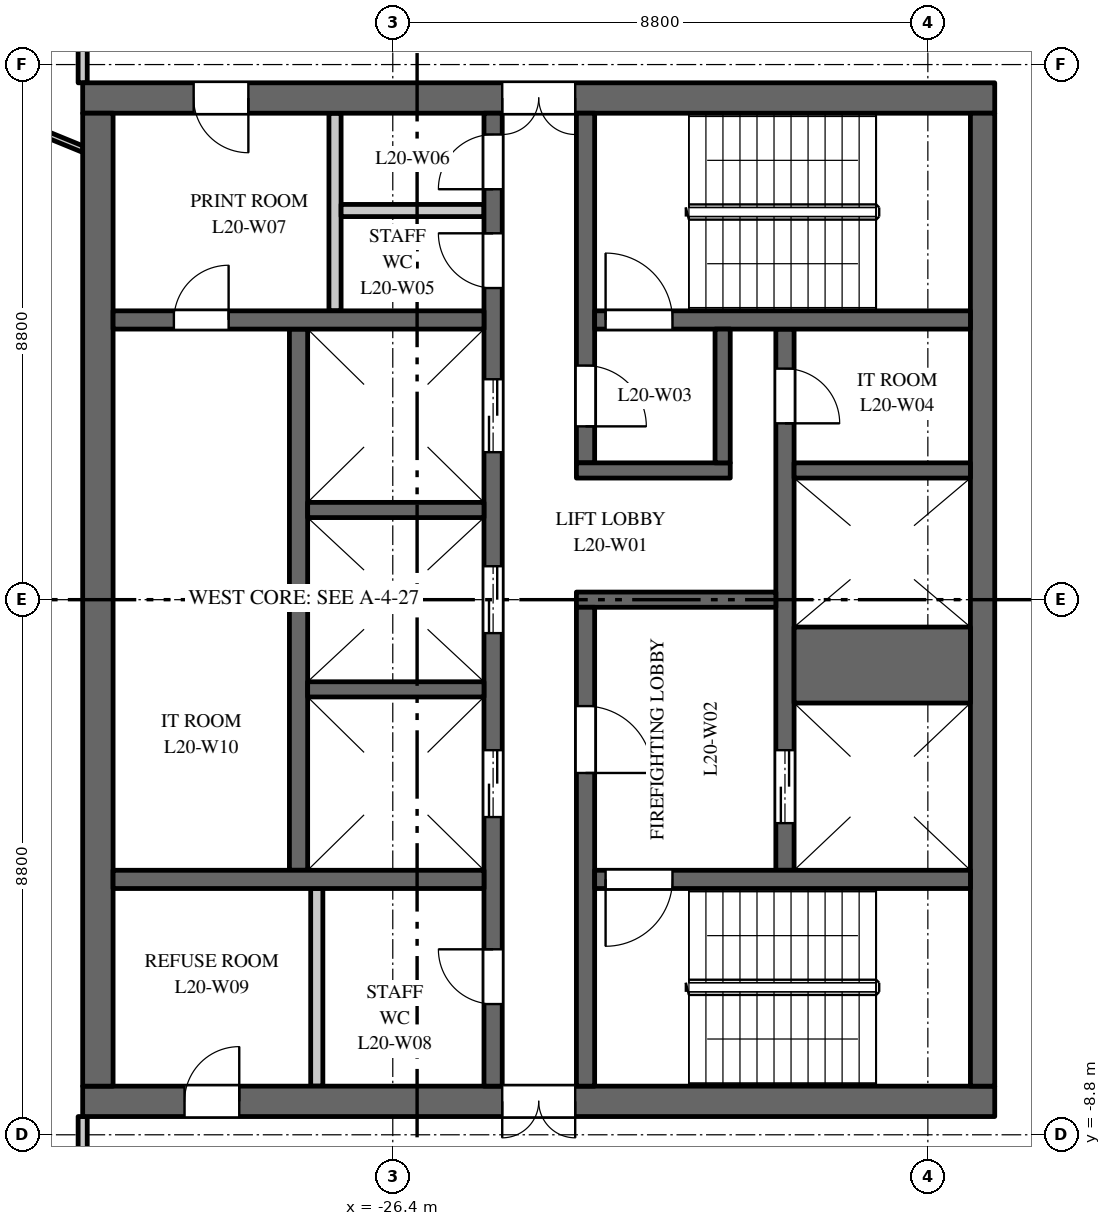
"""IFC4 building model, lengths in metres.
Left out: names, types, materials, properties, quantities, classifications, styles, units other than length and angle.
Written with IfcOpenShell. Run it as: python <this file> out.ifc"""

import sys

from ifc_helpers import new_model, si_unit, direction, frame, frame_2d, origin, place, context, subcontext, project, spatial, rectangle, extrude, element, fill, save


model = new_model("IFC4")
c1 = context("Model", 3, precision=1e-05, world=origin(), true_north=direction((0.0, 1.0)))
c2 = subcontext(c1, "Body", "Model", "MODEL_VIEW")
j1 = project(units=[si_unit("LENGTHUNIT", "METRE"), si_unit("PLANEANGLEUNIT", "RADIAN")], contexts=[c1])
p1 = place(None, origin())
s1 = spatial("IfcSite", under=j1, at=p1, CompositionType="ELEMENT")
p2 = place(p1, origin())
s2 = spatial("IfcBuilding", under=s1, at=p2, CompositionType="ELEMENT")
p3 = place(p2, frame((0.0, 0.0, 92.0)))
s3 = spatial("IfcBuildingStorey", under=s2, at=p3, CompositionType="ELEMENT", Elevation=92.0)
p4 = place(p3, frame((-16.5, 8.25, 0.0), z_axis=(0.0, 0.0, 1.0), x_axis=(-1.0, 0.0, 0.0)))
e1 = element("IfcWall", 1, at=p4, inside=s3, PredefinedType="SHEAR", context=c2, shape_type="SweptSolid", body=[
    extrude(rectangle(XDim=15.0, YDim=0.5, at=frame_2d((7.5, 0.0))), origin(), (0.0, 0.0, 1.0), 3.7),
])
p5 = place(p4, frame((6.9, 0.0, 0.0)))
e2 = element("IfcOpeningElement", 2, at=p5, cuts=e1, PredefinedType="OPENING", context=c2, shape_type="SweptSolid", body=[
    extrude(rectangle(XDim=1.2, YDim=2.1, at=frame_2d((0.6, 1.05))), frame((0.0, 0.26, 0.0), z_axis=(0.0, -1.0, 0.0), x_axis=(1.0, 0.0, 0.0)), (0.0, 0.0, 1.0), 0.52),
])
p6 = place(p4, frame((12.275, 0.0, 0.0)))
e3 = element("IfcOpeningElement", 3, at=p6, cuts=e1, PredefinedType="OPENING", context=c2, shape_type="SweptSolid", body=[
    extrude(rectangle(XDim=0.9, YDim=2.1, at=frame_2d((0.45, 1.05))), frame((0.0, 0.26, 0.0), z_axis=(0.0, -1.0, 0.0), x_axis=(1.0, 0.0, 0.0)), (0.0, 0.0, 1.0), 0.52),
])
p7 = place(p3, frame((-16.5, -8.25, 0.0), z_axis=(0.0, 0.0, 1.0), x_axis=(-1.0, 0.0, 0.0)))
e4 = element("IfcWall", 4, at=p7, inside=s3, PredefinedType="SHEAR", context=c2, shape_type="SweptSolid", body=[
    extrude(rectangle(XDim=15.0, YDim=0.5, at=frame_2d((7.5, 0.0))), origin(), (0.0, 0.0, 1.0), 3.7),
])
p8 = place(p7, frame((6.9, 0.0, 0.0)))
e5 = element("IfcOpeningElement", 5, at=p8, cuts=e4, PredefinedType="OPENING", context=c2, shape_type="SweptSolid", body=[
    extrude(rectangle(XDim=1.2, YDim=2.1, at=frame_2d((0.6, 1.05))), frame((0.0, 0.26, 0.0), z_axis=(0.0, -1.0, 0.0), x_axis=(1.0, 0.0, 0.0)), (0.0, 0.0, 1.0), 0.52),
])
p9 = place(p7, frame((12.425, 0.0, 0.0)))
e6 = element("IfcOpeningElement", 6, at=p9, cuts=e4, PredefinedType="OPENING", context=c2, shape_type="SweptSolid", body=[
    extrude(rectangle(XDim=0.9, YDim=2.1, at=frame_2d((0.45, 1.05))), frame((0.0, 0.26, 0.0), z_axis=(0.0, -1.0, 0.0), x_axis=(1.0, 0.0, 0.0)), (0.0, 0.0, 1.0), 0.52),
])
p10 = place(p3, frame((-27.95, -4.45, 0.0), z_axis=(0.0, 0.0, 1.0), x_axis=(0.0, 1.0, 0.0)))
e7 = element("IfcWall", 7, at=p10, inside=s3, PredefinedType="SHEAR", context=c2, shape_type="SweptSolid", body=[
    extrude(rectangle(XDim=8.9, YDim=0.3, at=frame_2d((4.45, 0.0))), origin(), (0.0, 0.0, 1.0), 3.7),
])
p11 = place(p3, frame((-19.95, -4.45, 0.0), z_axis=(0.0, 0.0, 1.0), x_axis=(0.0, 1.0, 0.0)))
e8 = element("IfcWall", 8, at=p11, inside=s3, PredefinedType="SHEAR", context=c2, shape_type="SweptSolid", body=[
    extrude(rectangle(XDim=8.9, YDim=0.3, at=frame_2d((4.45, 0.0))), origin(), (0.0, 0.0, 1.0), 3.7),
])
p12 = place(p11, frame((0.775, 0.0, 0.0)))
e9 = element("IfcOpeningElement", 9, at=p12, cuts=e8, PredefinedType="OPENING", context=c2, shape_type="SweptSolid", body=[
    extrude(rectangle(XDim=1.2, YDim=2.1, at=frame_2d((0.6, 1.05))), frame((0.0, 0.16, 0.0), z_axis=(0.0, -1.0, 0.0), x_axis=(1.0, 0.0, 0.0)), (0.0, 0.0, 1.0), 0.32),
])
p13 = place(p11, frame((7.35, 0.0, 0.0)))
e10 = element("IfcOpeningElement", 10, at=p13, cuts=e8, PredefinedType="OPENING", context=c2, shape_type="SweptSolid", body=[
    extrude(rectangle(XDim=0.9, YDim=2.1, at=frame_2d((0.45, 1.05))), frame((0.0, 0.16, 0.0), z_axis=(0.0, -1.0, 0.0), x_axis=(1.0, 0.0, 0.0)), (0.0, 0.0, 1.0), 0.32),
])
p14 = place(p3, frame((-24.75, -8.0, 0.0), z_axis=(0.0, 0.0, 1.0), x_axis=(0.0, 1.0, 0.0)))
e11 = element("IfcWall", 11, at=p14, inside=s3, PredefinedType="SHEAR", context=c2, shape_type="SweptSolid", body=[
    extrude(rectangle(XDim=16.0, YDim=0.3, at=frame_2d((8.0, 0.0))), origin(), (0.0, 0.0, 1.0), 3.7),
])
p15 = place(p14, frame((4.425, 0.0, 0.0)))
e12 = element("IfcOpeningElement", 12, at=p15, cuts=e11, PredefinedType="OPENING", context=c2, shape_type="SweptSolid", body=[
    extrude(rectangle(XDim=1.1, YDim=2.1, at=frame_2d((0.55, 1.05))), frame((0.0, 0.16, 0.0), z_axis=(0.0, -1.0, 0.0), x_axis=(1.0, 0.0, 0.0)), (0.0, 0.0, 1.0), 0.32),
])
p16 = place(p14, frame((7.45, 0.0, 0.0)))
e13 = element("IfcOpeningElement", 13, at=p16, cuts=e11, PredefinedType="OPENING", context=c2, shape_type="SweptSolid", body=[
    extrude(rectangle(XDim=1.1, YDim=2.1, at=frame_2d((0.55, 1.05))), frame((0.0, 0.16, 0.0), z_axis=(0.0, -1.0, 0.0), x_axis=(1.0, 0.0, 0.0)), (0.0, 0.0, 1.0), 0.32),
])
p17 = place(p14, frame((10.425, 0.0, 0.0)))
e14 = element("IfcOpeningElement", 14, at=p17, cuts=e11, PredefinedType="OPENING", context=c2, shape_type="SweptSolid", body=[
    extrude(rectangle(XDim=1.2, YDim=2.1, at=frame_2d((0.6, 1.05))), frame((0.0, 0.16, 0.0), z_axis=(0.0, -1.0, 0.0), x_axis=(1.0, 0.0, 0.0)), (0.0, 0.0, 1.0), 0.32),
])
p18 = place(p14, frame((13.125, 0.0, 0.0)))
e15 = element("IfcOpeningElement", 15, at=p18, cuts=e11, PredefinedType="OPENING", context=c2, shape_type="SweptSolid", body=[
    extrude(rectangle(XDim=0.9, YDim=2.1, at=frame_2d((0.45, 1.05))), frame((0.0, 0.16, 0.0), z_axis=(0.0, -1.0, 0.0), x_axis=(1.0, 0.0, 0.0)), (0.0, 0.0, 1.0), 0.32),
])
p19 = place(p14, frame((14.75, 0.0, 0.0)))
e16 = element("IfcOpeningElement", 16, at=p19, cuts=e11, PredefinedType="OPENING", context=c2, shape_type="SweptSolid", body=[
    extrude(rectangle(XDim=0.9, YDim=2.1, at=frame_2d((0.45, 1.05))), frame((0.0, 0.16, 0.0), z_axis=(0.0, -1.0, 0.0), x_axis=(1.0, 0.0, 0.0)), (0.0, 0.0, 1.0), 0.32),
])
p20 = place(p14, frame((1.35, 0.0, 0.0)))
e17 = element("IfcOpeningElement", 17, at=p20, cuts=e11, PredefinedType="OPENING", context=c2, shape_type="SweptSolid", body=[
    extrude(rectangle(XDim=0.9, YDim=2.1, at=frame_2d((0.45, 1.05))), frame((0.0, 0.16, 0.0), z_axis=(0.0, -1.0, 0.0), x_axis=(1.0, 0.0, 0.0)), (0.0, 0.0, 1.0), 0.32),
])
p21 = place(p3, frame((-20.1, 0.0, 0.0), z_axis=(0.0, 0.0, 1.0), x_axis=(-1.0, 0.0, 0.0)))
e18 = element("IfcWall", 18, at=p21, inside=s3, PredefinedType="SHEAR", context=c2, shape_type="SweptSolid", body=[
    extrude(rectangle(XDim=3.28, YDim=0.25, at=frame_2d((1.64, 0.0))), origin(), (0.0, 0.0, 1.0), 3.7),
])
p22 = place(p3, frame((-16.7, -8.0, 0.0), z_axis=(0.0, 0.0, 1.0), x_axis=(0.0, 1.0, 0.0)))
e19 = element("IfcWall", 19, at=p22, inside=s3, PredefinedType="SHEAR", context=c2, shape_type="SweptSolid", body=[
    extrude(rectangle(XDim=16.0, YDim=0.4, at=frame_2d((8.0, 0.0))), origin(), (0.0, 0.0, 1.0), 3.7),
])
p23 = place(p3, frame((-31.25, -8.0, 0.0), z_axis=(0.0, 0.0, 1.0), x_axis=(0.0, 1.0, 0.0)))
e20 = element("IfcWall", 20, at=p23, inside=s3, PredefinedType="SHEAR", context=c2, shape_type="SweptSolid", body=[
    extrude(rectangle(XDim=16.0, YDim=0.5, at=frame_2d((8.0, 0.0))), origin(), (0.0, 0.0, 1.0), 3.7),
])
p24 = place(p3, frame((-24.9, 4.6, 0.0), z_axis=(0.0, 0.0, 1.0), x_axis=(-1.0, 0.0, 0.0)))
e21 = element("IfcWall", 21, at=p24, inside=s3, PredefinedType="SHEAR", context=c2, shape_type="SweptSolid", body=[
    extrude(rectangle(XDim=6.1, YDim=0.3, at=frame_2d((3.05, 0.0))), origin(), (0.0, 0.0, 1.0), 3.7),
])
p25 = place(p24, frame((4.2, 0.0, 0.0)))
e22 = element("IfcOpeningElement", 22, at=p25, cuts=e21, PredefinedType="OPENING", context=c2, shape_type="SweptSolid", body=[
    extrude(rectangle(XDim=0.9, YDim=2.1, at=frame_2d((0.45, 1.05))), frame((0.0, 0.16, 0.0), z_axis=(0.0, -1.0, 0.0), x_axis=(1.0, 0.0, 0.0)), (0.0, 0.0, 1.0), 0.32),
])
for number, where, z_axis, x_axis in (
    (23, (-27.35, 4.75, 0.0), (0.0, 0.0, 1.0), (0.0, 1.0, 0.0)),
    (24, (-27.65, -8.0, 0.0), (0.0, 0.0, 1.0), (0.0, 1.0, 0.0)),
):
    element("IfcWall", number, at=place(p3, frame(where, z_axis=z_axis, x_axis=x_axis)), inside=s3, PredefinedType="PARTITIONING", context=c2, shape_type="SweptSolid", body=[
        extrude(rectangle(XDim=3.25, YDim=0.2, at=frame_2d((1.625, 0.0))), origin(), (0.0, 0.0, 1.0), 3.7),
    ])
p26 = place(p3, frame((-24.9, 6.4, 0.0), z_axis=(0.0, 0.0, 1.0), x_axis=(-1.0, 0.0, 0.0)))
e25 = element("IfcWall", 25, at=p26, inside=s3, PredefinedType="PARTITIONING", context=c2, shape_type="SweptSolid", body=[
    extrude(rectangle(XDim=2.35, YDim=0.2, at=frame_2d((1.175, 0.0))), origin(), (0.0, 0.0, 1.0), 3.7),
])
p27 = place(p3, frame((-24.9, -4.6, 0.0), z_axis=(0.0, 0.0, 1.0), x_axis=(-1.0, 0.0, 0.0)))
e26 = element("IfcWall", 26, at=p27, inside=s3, PredefinedType="SHEAR", context=c2, shape_type="SweptSolid", body=[
    extrude(rectangle(XDim=6.1, YDim=0.3, at=frame_2d((3.05, 0.0))), origin(), (0.0, 0.0, 1.0), 3.7),
])
p28 = place(p3, frame((-16.9, -1.075, 0.0), z_axis=(0.0, 0.0, 1.0), x_axis=(-1.0, 0.0, 0.0)))
e27 = element("IfcWall", 27, at=p28, inside=s3, PredefinedType="SHEAR", context=c2, shape_type="SweptSolid", body=[
    extrude(rectangle(XDim=2.9, YDim=1.25, at=frame_2d((1.45, 0.0))), origin(), (0.0, 0.0, 1.0), 3.7),
])
for number, where, z_axis, x_axis in (
    (28, (-16.9, 2.125, 0.0), (0.0, 0.0, 1.0), (-1.0, 0.0, 0.0)),
    (29, (-24.9, -1.475, 0.0), (0.0, 0.0, 1.0), (-1.0, 0.0, 0.0)),
    (30, (-24.9, 1.475, 0.0), (0.0, 0.0, 1.0), (-1.0, 0.0, 0.0)),
):
    element("IfcWall", number, at=place(p3, frame(where, z_axis=z_axis, x_axis=x_axis)), inside=s3, PredefinedType="SHEAR", context=c2, shape_type="SweptSolid", body=[
        extrude(rectangle(XDim=2.9, YDim=0.25, at=frame_2d((1.45, 0.0))), origin(), (0.0, 0.0, 1.0), 3.7),
    ])
p29 = place(p3, frame((-23.23, 2.25, 0.0), z_axis=(0.0, 0.0, 1.0), x_axis=(0.0, 1.0, 0.0)))
e31 = element("IfcWall", 31, at=p29, inside=s3, PredefinedType="SHEAR", context=c2, shape_type="SweptSolid", body=[
    extrude(rectangle(XDim=5.75, YDim=0.3, at=frame_2d((2.875, 0.0))), origin(), (0.0, 0.0, 1.0), 3.7),
])
p30 = place(p29, frame((0.6, 0.0, 0.0)))
e32 = element("IfcOpeningElement", 32, at=p30, cuts=e31, PredefinedType="OPENING", context=c2, shape_type="SweptSolid", body=[
    extrude(rectangle(XDim=1.0, YDim=2.1, at=frame_2d((0.5, 1.05))), frame((0.0, 0.16, 0.0), z_axis=(0.0, -1.0, 0.0), x_axis=(1.0, 0.0, 0.0)), (0.0, 0.0, 1.0), 0.32),
])
p31 = place(p3, frame((-23.23, -8.0, 0.0), z_axis=(0.0, 0.0, 1.0), x_axis=(0.0, 1.0, 0.0)))
e33 = element("IfcWall", 33, at=p31, inside=s3, PredefinedType="SHEAR", context=c2, shape_type="SweptSolid", body=[
    extrude(rectangle(XDim=7.875, YDim=0.3, at=frame_2d((3.938, 0.0))), origin(), (0.0, 0.0, 1.0), 3.7),
])
p32 = place(p31, frame((5.15, 0.0, 0.0)))
e34 = element("IfcOpeningElement", 34, at=p32, cuts=e33, PredefinedType="OPENING", context=c2, shape_type="SweptSolid", body=[
    extrude(rectangle(XDim=1.1, YDim=2.1, at=frame_2d((0.55, 1.05))), frame((0.0, 0.16, 0.0), z_axis=(0.0, -1.0, 0.0), x_axis=(1.0, 0.0, 0.0)), (0.0, 0.0, 1.0), 0.32),
])
p33 = place(p3, frame((-16.9, 4.6, 0.0), z_axis=(0.0, 0.0, 1.0), x_axis=(-1.0, 0.0, 0.0)))
e35 = element("IfcWall", 35, at=p33, inside=s3, PredefinedType="SHEAR", context=c2, shape_type="SweptSolid", body=[
    extrude(rectangle(XDim=6.18, YDim=0.3, at=frame_2d((3.09, 0.0))), origin(), (0.0, 0.0, 1.0), 3.7),
])
p34 = place(p33, frame((4.9, 0.0, 0.0)))
e36 = element("IfcOpeningElement", 36, at=p34, cuts=e35, PredefinedType="OPENING", context=c2, shape_type="SweptSolid", body=[
    extrude(rectangle(XDim=1.1, YDim=2.1, at=frame_2d((0.55, 1.05))), frame((0.0, 0.16, 0.0), z_axis=(0.0, -1.0, 0.0), x_axis=(1.0, 0.0, 0.0)), (0.0, 0.0, 1.0), 0.32),
])
p35 = place(p3, frame((-16.9, -4.6, 0.0), z_axis=(0.0, 0.0, 1.0), x_axis=(-1.0, 0.0, 0.0)))
e37 = element("IfcWall", 37, at=p35, inside=s3, PredefinedType="SHEAR", context=c2, shape_type="SweptSolid", body=[
    extrude(rectangle(XDim=6.18, YDim=0.3, at=frame_2d((3.09, 0.0))), origin(), (0.0, 0.0, 1.0), 3.7),
])
p36 = place(p35, frame((4.9, 0.0, 0.0)))
e38 = element("IfcOpeningElement", 38, at=p36, cuts=e37, PredefinedType="OPENING", context=c2, shape_type="SweptSolid", body=[
    extrude(rectangle(XDim=1.1, YDim=2.1, at=frame_2d((0.55, 1.05))), frame((0.0, 0.16, 0.0), z_axis=(0.0, -1.0, 0.0), x_axis=(1.0, 0.0, 0.0)), (0.0, 0.0, 1.0), 0.32),
])
p37 = place(p3, frame((-20.85, 2.125, 0.0), z_axis=(0.0, 0.0, 1.0), x_axis=(-1.0, 0.0, 0.0)))
e39 = element("IfcWall", 39, at=p37, inside=s3, PredefinedType="SHEAR", context=c2, shape_type="SweptSolid", body=[
    extrude(rectangle(XDim=2.53, YDim=0.25, at=frame_2d((1.265, 0.0))), origin(), (0.0, 0.0, 1.0), 3.7),
])
p38 = place(p3, frame((-20.975, 2.25, 0.0), z_axis=(0.0, 0.0, 1.0), x_axis=(0.0, 1.0, 0.0)))
e40 = element("IfcWall", 40, at=p38, inside=s3, PredefinedType="SHEAR", context=c2, shape_type="SweptSolid", body=[
    extrude(rectangle(XDim=2.2, YDim=0.25, at=frame_2d((1.1, 0.0))), origin(), (0.0, 0.0, 1.0), 3.7),
])
p39 = place(p3, frame((-34.234, 8.53, 0.0), z_axis=(0.0, 0.0, 1.0), x_axis=(0.925344112436, -0.379128307542, 0.0)))
e41 = element("IfcWall", 41, at=p39, inside=s3, PredefinedType="PARTITIONING", context=c2, shape_type="SweptSolid", body=[
    extrude(rectangle(XDim=2.954, YDim=0.1, at=frame_2d((1.477, 0.0))), origin(), (0.0, 0.0, 1.0), 2.9),
])
for number, where, z_axis, x_axis in (
    (42, (-31.5, -10.7, 0.0), (0.0, 0.0, 1.0), (0.0, 1.0, 0.0)),
    (43, (-31.5, 8.5, 0.0), (0.0, 0.0, 1.0), (0.0, 1.0, 0.0)),
):
    element("IfcWall", number, at=place(p3, frame(where, z_axis=z_axis, x_axis=x_axis)), inside=s3, PredefinedType="PARTITIONING", context=c2, shape_type="SweptSolid", body=[
        extrude(rectangle(XDim=2.2, YDim=0.15, at=frame_2d((1.1, 0.0))), origin(), (0.0, 0.0, 1.0), 3.7),
    ])
p40 = place(p12, origin())
e44 = element("IfcDoor", 44, at=p40, inside=s3, OperationType="DOUBLE_DOOR_SLIDING", PredefinedType="DOOR", context=c2, shape_type="SweptSolid", body=[
    extrude(rectangle(XDim=1.2, YDim=2.1, at=frame_2d((0.6, 1.05))), frame((0.0, 0.025, 0.0), z_axis=(0.0, -1.0, 0.0), x_axis=(1.0, 0.0, 0.0)), (0.0, 0.0, 1.0), 0.05),
])
fill(e9, e44)
p41 = place(p15, origin())
e45 = element("IfcDoor", 45, at=p41, inside=s3, OperationType="DOUBLE_DOOR_SLIDING", PredefinedType="DOOR", context=c2, shape_type="SweptSolid", body=[
    extrude(rectangle(XDim=1.1, YDim=2.1, at=frame_2d((0.55, 1.05))), frame((0.0, 0.025, 0.0), z_axis=(0.0, -1.0, 0.0), x_axis=(1.0, 0.0, 0.0)), (0.0, 0.0, 1.0), 0.05),
])
fill(e12, e45)
p42 = place(p16, origin())
e46 = element("IfcDoor", 46, at=p42, inside=s3, OperationType="DOUBLE_DOOR_SLIDING", PredefinedType="DOOR", context=c2, shape_type="SweptSolid", body=[
    extrude(rectangle(XDim=1.1, YDim=2.1, at=frame_2d((0.55, 1.05))), frame((0.0, 0.025, 0.0), z_axis=(0.0, -1.0, 0.0), x_axis=(1.0, 0.0, 0.0)), (0.0, 0.0, 1.0), 0.05),
])
fill(e13, e46)
p43 = place(p17, origin())
e47 = element("IfcDoor", 47, at=p43, inside=s3, OperationType="DOUBLE_DOOR_SLIDING", PredefinedType="DOOR", context=c2, shape_type="SweptSolid", body=[
    extrude(rectangle(XDim=1.2, YDim=2.1, at=frame_2d((0.6, 1.05))), frame((0.0, 0.025, 0.0), z_axis=(0.0, -1.0, 0.0), x_axis=(1.0, 0.0, 0.0)), (0.0, 0.0, 1.0), 0.05),
])
fill(e14, e47)
p44 = place(p34, origin())
e48 = element("IfcDoor", 48, at=p44, inside=s3, OperationType="SINGLE_SWING_RIGHT", PredefinedType="DOOR", context=c2, shape_type="SweptSolid", body=[
    extrude(rectangle(XDim=1.1, YDim=2.1, at=frame_2d((0.55, 1.05))), frame((0.0, 0.025, 0.0), z_axis=(0.0, -1.0, 0.0), x_axis=(1.0, 0.0, 0.0)), (0.0, 0.0, 1.0), 0.05),
])
fill(e36, e48)
p45 = place(p36, origin())
e49 = element("IfcDoor", 49, at=p45, inside=s3, OperationType="SINGLE_SWING_LEFT", PredefinedType="DOOR", context=c2, shape_type="SweptSolid", body=[
    extrude(rectangle(XDim=1.1, YDim=2.1, at=frame_2d((0.55, 1.05))), frame((0.0, 0.025, 0.0), z_axis=(0.0, -1.0, 0.0), x_axis=(1.0, 0.0, 0.0)), (0.0, 0.0, 1.0), 0.05),
])
fill(e38, e49)
p46 = place(p32, origin())
e50 = element("IfcDoor", 50, at=p46, inside=s3, OperationType="SINGLE_SWING_LEFT", PredefinedType="DOOR", context=c2, shape_type="SweptSolid", body=[
    extrude(rectangle(XDim=1.1, YDim=2.1, at=frame_2d((0.55, 1.05))), frame((0.0, 0.025, 0.0), z_axis=(0.0, -1.0, 0.0), x_axis=(1.0, 0.0, 0.0)), (0.0, 0.0, 1.0), 0.05),
])
fill(e34, e50)
p47 = place(p30, origin())
e51 = element("IfcDoor", 51, at=p47, inside=s3, OperationType="SINGLE_SWING_LEFT", PredefinedType="DOOR", context=c2, shape_type="SweptSolid", body=[
    extrude(rectangle(XDim=1.0, YDim=2.1, at=frame_2d((0.5, 1.05))), frame((0.0, 0.025, 0.0), z_axis=(0.0, -1.0, 0.0), x_axis=(1.0, 0.0, 0.0)), (0.0, 0.0, 1.0), 0.05),
])
fill(e32, e51)
p48 = place(p5, origin())
e52 = element("IfcDoor", 52, at=p48, inside=s3, OperationType="DOUBLE_DOOR_DOUBLE_SWING", PredefinedType="DOOR", context=c2, shape_type="SweptSolid", body=[
    extrude(rectangle(XDim=1.2, YDim=2.1, at=frame_2d((0.6, 1.05))), frame((0.0, 0.025, 0.0), z_axis=(0.0, -1.0, 0.0), x_axis=(1.0, 0.0, 0.0)), (0.0, 0.0, 1.0), 0.05),
])
fill(e2, e52)
p49 = place(p8, origin())
e53 = element("IfcDoor", 53, at=p49, inside=s3, OperationType="DOUBLE_DOOR_DOUBLE_SWING", PredefinedType="DOOR", context=c2, shape_type="SweptSolid", body=[
    extrude(rectangle(XDim=1.2, YDim=2.1, at=frame_2d((0.6, 1.05))), frame((0.0, 0.025, 0.0), z_axis=(0.0, -1.0, 0.0), x_axis=(1.0, 0.0, 0.0)), (0.0, 0.0, 1.0), 0.05),
])
fill(e5, e53)
p50 = place(p13, origin())
e54 = element("IfcDoor", 54, at=p50, inside=s3, OperationType="SINGLE_SWING_LEFT", PredefinedType="DOOR", context=c2, shape_type="SweptSolid", body=[
    extrude(rectangle(XDim=0.9, YDim=2.1, at=frame_2d((0.45, 1.05))), frame((0.0, 0.025, 0.0), z_axis=(0.0, -1.0, 0.0), x_axis=(1.0, 0.0, 0.0)), (0.0, 0.0, 1.0), 0.05),
])
fill(e10, e54)
p51 = place(p18, origin())
e55 = element("IfcDoor", 55, at=p51, inside=s3, OperationType="SINGLE_SWING_LEFT", PredefinedType="DOOR", context=c2, shape_type="SweptSolid", body=[
    extrude(rectangle(XDim=0.9, YDim=2.1, at=frame_2d((0.45, 1.05))), frame((0.0, 0.025, 0.0), z_axis=(0.0, -1.0, 0.0), x_axis=(1.0, 0.0, 0.0)), (0.0, 0.0, 1.0), 0.05),
])
fill(e15, e55)
p52 = place(p19, origin())
e56 = element("IfcDoor", 56, at=p52, inside=s3, OperationType="SINGLE_SWING_RIGHT", PredefinedType="DOOR", context=c2, shape_type="SweptSolid", body=[
    extrude(rectangle(XDim=0.9, YDim=2.1, at=frame_2d((0.45, 1.05))), frame((0.0, 0.025, 0.0), z_axis=(0.0, -1.0, 0.0), x_axis=(1.0, 0.0, 0.0)), (0.0, 0.0, 1.0), 0.05),
])
fill(e16, e56)
p53 = place(p6, origin())
e57 = element("IfcDoor", 57, at=p53, inside=s3, OperationType="SINGLE_SWING_RIGHT", PredefinedType="DOOR", context=c2, shape_type="SweptSolid", body=[
    extrude(rectangle(XDim=0.9, YDim=2.1, at=frame_2d((0.45, 1.05))), frame((0.0, 0.025, 0.0), z_axis=(0.0, -1.0, 0.0), x_axis=(1.0, 0.0, 0.0)), (0.0, 0.0, 1.0), 0.05),
])
fill(e3, e57)
p54 = place(p20, origin())
e58 = element("IfcDoor", 58, at=p54, inside=s3, OperationType="SINGLE_SWING_LEFT", PredefinedType="DOOR", context=c2, shape_type="SweptSolid", body=[
    extrude(rectangle(XDim=0.9, YDim=2.1, at=frame_2d((0.45, 1.05))), frame((0.0, 0.025, 0.0), z_axis=(0.0, -1.0, 0.0), x_axis=(1.0, 0.0, 0.0)), (0.0, 0.0, 1.0), 0.05),
])
fill(e17, e58)
p55 = place(p9, origin())
e59 = element("IfcDoor", 59, at=p55, inside=s3, OperationType="SINGLE_SWING_LEFT", PredefinedType="DOOR", context=c2, shape_type="SweptSolid", body=[
    extrude(rectangle(XDim=0.9, YDim=2.1, at=frame_2d((0.45, 1.05))), frame((0.0, 0.025, 0.0), z_axis=(0.0, -1.0, 0.0), x_axis=(1.0, 0.0, 0.0)), (0.0, 0.0, 1.0), 0.05),
])
fill(e6, e59)
p56 = place(p25, origin())
e60 = element("IfcDoor", 60, at=p56, inside=s3, OperationType="SINGLE_SWING_LEFT", PredefinedType="DOOR", context=c2, shape_type="SweptSolid", body=[
    extrude(rectangle(XDim=0.9, YDim=2.1, at=frame_2d((0.45, 1.05))), frame((0.0, 0.025, 0.0), z_axis=(0.0, -1.0, 0.0), x_axis=(1.0, 0.0, 0.0)), (0.0, 0.0, 1.0), 0.05),
])
fill(e22, e60)
save(model, sys.argv[1])
